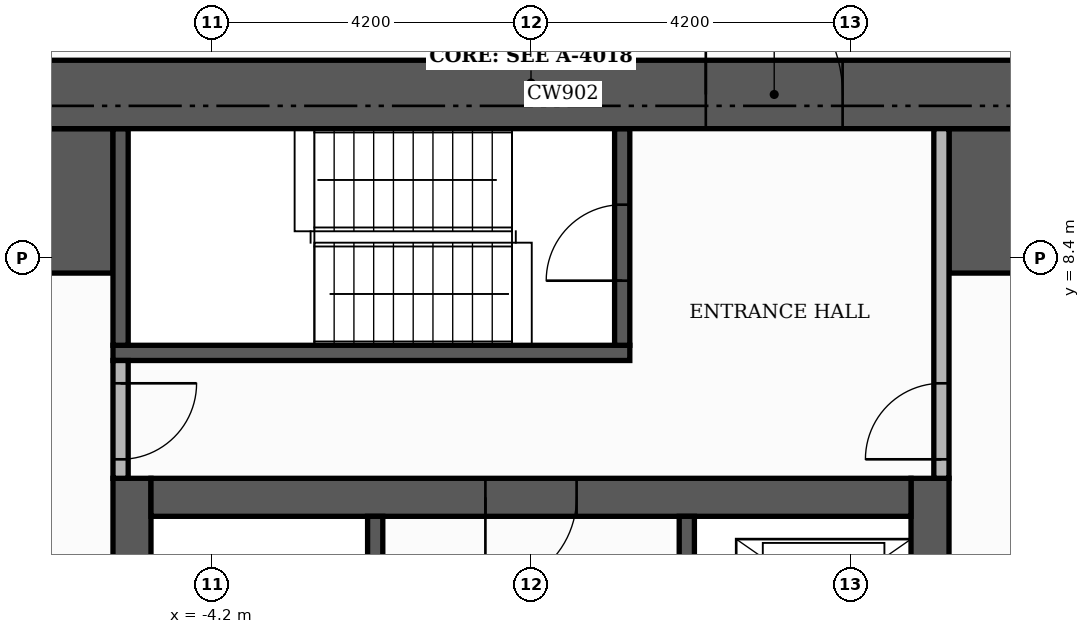
"""IFC4 building model, lengths in metres.
Left out: names, types, materials, properties, quantities, classifications, styles, units other than length and angle.
Written with IfcOpenShell. Run it as: python <this file> out.ifc"""

import sys

from ifc_helpers import new_model, si_unit, direction, frame, frame_2d, origin, place, context, subcontext, project, spatial, rectangle, extrude, element, fill, save


model = new_model("IFC4")
c1 = context("Model", 3, precision=1e-05, world=origin(), true_north=direction((0.0, 1.0)))
c2 = subcontext(c1, "Body", "Model", "MODEL_VIEW")
j1 = project(units=[si_unit("LENGTHUNIT", "METRE"), si_unit("PLANEANGLEUNIT", "RADIAN")], contexts=[c1])
p1 = place(None, origin())
s1 = spatial("IfcSite", under=j1, at=p1, CompositionType="ELEMENT")
p2 = place(p1, origin())
s2 = spatial("IfcBuilding", under=s1, at=p2, CompositionType="ELEMENT")
p3 = place(p2, frame((0.0, 0.0, 118.2)))
s3 = spatial("IfcBuildingStorey", under=s2, at=p3, CompositionType="ELEMENT", Elevation=118.2)
for number, where, z_axis, x_axis in (
    (1, (-5.25, -5.0, 0.0), (0.0, 0.0, 1.0), (0.0, 1.0, 0.0)),
    (2, (5.25, -5.0, 0.0), (0.0, 0.0, 1.0), (0.0, 1.0, 0.0)),
):
    element("IfcWall", number, at=place(p3, frame(where, z_axis=z_axis, x_axis=x_axis)), inside=s3, PredefinedType="SHEAR", context=c2, shape_type="SweptSolid", body=[
        extrude(rectangle(XDim=10.5, YDim=0.5, at=frame_2d((5.25, 0.0))), origin(), (0.0, 0.0, 1.0), 3.48),
    ])
p4 = place(p3, frame((-5.0, 5.25, 0.0), z_axis=(0.0, 0.0, 1.0), x_axis=(1.0, 0.0, 0.0)))
e3 = element("IfcWall", 3, at=p4, inside=s3, PredefinedType="SHEAR", context=c2, shape_type="SweptSolid", body=[
    extrude(rectangle(XDim=10.0, YDim=0.5, at=frame_2d((5.0, 0.0))), origin(), (0.0, 0.0, 1.0), 3.48),
])
p5 = place(p4, frame((4.4, 0.0, 0.0)))
e4 = element("IfcOpeningElement", 4, at=p5, cuts=e3, PredefinedType="OPENING", context=c2, shape_type="SweptSolid", body=[
    extrude(rectangle(XDim=1.2, YDim=2.1, at=frame_2d((0.6, 1.05))), frame((0.0, 0.26, 0.0), z_axis=(0.0, -1.0, 0.0), x_axis=(1.0, 0.0, 0.0)), (0.0, 0.0, 1.0), 0.52),
])
for number, where, z_axis, x_axis in (
    (5, (-10.1, 9.15, 0.0), (0.0, 0.0, 1.0), (1.0, 0.0, 0.0)),
    (6, (5.5, 9.15, 0.0), (0.0, 0.0, 1.0), (1.0, 0.0, 0.0)),
):
    element("IfcWall", number, at=place(p3, frame(where, z_axis=z_axis, x_axis=x_axis)), inside=s3, PredefinedType="SHEAR", context=c2, shape_type="SweptSolid", body=[
        extrude(rectangle(XDim=4.6, YDim=1.9, at=frame_2d((2.3, 0.0))), origin(), (0.0, 0.0, 1.0), 3.48),
    ])
p6 = place(p3, frame((-2.05, -1.4, 0.0), z_axis=(0.0, 0.0, 1.0), x_axis=(0.0, 1.0, 0.0)))
e7 = element("IfcWall", 7, at=p6, inside=s3, PredefinedType="SHEAR", context=c2, shape_type="SweptSolid", body=[
    extrude(rectangle(XDim=6.4, YDim=0.2, at=frame_2d((3.2, 0.0))), origin(), (0.0, 0.0, 1.0), 3.48),
])
p7 = place(p6, frame((0.15, 0.0, 0.0)))
e8 = element("IfcOpeningElement", 8, at=p7, cuts=e7, PredefinedType="OPENING", context=c2, shape_type="SweptSolid", body=[
    extrude(rectangle(XDim=1.0, YDim=2.1, at=frame_2d((0.5, 1.05))), frame((0.0, 0.11, 0.0), z_axis=(0.0, -1.0, 0.0), x_axis=(1.0, 0.0, 0.0)), (0.0, 0.0, 1.0), 0.22),
])
p8 = place(p3, frame((-5.5, 7.15, 0.0), z_axis=(0.0, 0.0, 1.0), x_axis=(1.0, 0.0, 0.0)))
e9 = element("IfcWall", 9, at=p8, inside=s3, PredefinedType="SHEAR", context=c2, shape_type="SweptSolid", body=[
    extrude(rectangle(XDim=6.8, YDim=0.2, at=frame_2d((3.4, 0.0))), origin(), (0.0, 0.0, 1.0), 3.48),
])
p9 = place(p3, frame((-5.4, 7.25, 0.0), z_axis=(0.0, 0.0, 1.0), x_axis=(0.0, 1.0, 0.0)))
e10 = element("IfcWall", 10, at=p9, inside=s3, PredefinedType="SHEAR", context=c2, shape_type="SweptSolid", body=[
    extrude(rectangle(XDim=2.85, YDim=0.2, at=frame_2d((1.425, 0.0))), origin(), (0.0, 0.0, 1.0), 3.48),
])
p10 = place(p3, frame((1.2, 7.25, 0.0), z_axis=(0.0, 0.0, 1.0), x_axis=(0.0, 1.0, 0.0)))
e11 = element("IfcWall", 11, at=p10, inside=s3, PredefinedType="SHEAR", context=c2, shape_type="SweptSolid", body=[
    extrude(rectangle(XDim=2.85, YDim=0.2, at=frame_2d((1.425, 0.0))), origin(), (0.0, 0.0, 1.0), 3.48),
])
p11 = place(p10, frame((0.85, 0.0, 0.0)))
e12 = element("IfcOpeningElement", 12, at=p11, cuts=e11, PredefinedType="OPENING", context=c2, shape_type="SweptSolid", body=[
    extrude(rectangle(XDim=1.0, YDim=2.1, at=frame_2d((0.5, 1.05))), frame((0.0, 0.11, 0.0), z_axis=(0.0, -1.0, 0.0), x_axis=(1.0, 0.0, 0.0)), (0.0, 0.0, 1.0), 0.22),
])
p12 = place(p3, frame((2.05, 1.6, 0.0), z_axis=(0.0, 0.0, 1.0), x_axis=(0.0, 1.0, 0.0)))
e13 = element("IfcWall", 13, at=p12, inside=s3, PredefinedType="SHEAR", context=c2, shape_type="SweptSolid", body=[
    extrude(rectangle(XDim=3.4, YDim=0.2, at=frame_2d((1.7, 0.0))), origin(), (0.0, 0.0, 1.0), 3.48),
])
p13 = place(p12, frame((1.75, 0.0, 0.0)))
e14 = element("IfcOpeningElement", 14, at=p13, cuts=e13, PredefinedType="OPENING", context=c2, shape_type="SweptSolid", body=[
    extrude(rectangle(XDim=1.1, YDim=2.1, at=frame_2d((0.55, 1.05))), frame((0.0, 0.11, 0.0), z_axis=(0.0, -1.0, 0.0), x_axis=(1.0, 0.0, 0.0)), (0.0, 0.0, 1.0), 0.22),
])
p14 = place(p12, frame((0.15, 0.0, 0.0)))
e15 = element("IfcOpeningElement", 15, at=p14, cuts=e13, PredefinedType="OPENING", context=c2, shape_type="SweptSolid", body=[
    extrude(rectangle(XDim=0.8, YDim=2.1, at=frame_2d((0.4, 1.05))), frame((0.0, 0.11, 0.0), z_axis=(0.0, -1.0, 0.0), x_axis=(1.0, 0.0, 0.0)), (0.0, 0.0, 1.0), 0.22),
])
p15 = place(p3, frame((-11.0, 10.55, 0.0), z_axis=(0.0, 0.0, 1.0), x_axis=(1.0, 0.0, 0.0)))
e16 = element("IfcWall", 16, at=p15, inside=s3, PredefinedType="SHEAR", context=c2, shape_type="SweptSolid", body=[
    extrude(rectangle(XDim=22.0, YDim=0.9, at=frame_2d((11.0, 0.0))), origin(), (0.0, 0.0, 1.0), 3.48),
])
p16 = place(p15, frame((13.3, 0.0, 0.0)))
e17 = element("IfcOpeningElement", 17, at=p16, cuts=e16, PredefinedType="OPENING", context=c2, shape_type="SweptSolid", body=[
    extrude(rectangle(XDim=1.8, YDim=2.2, at=frame_2d((0.9, 1.1))), frame((0.0, 0.46, 0.0), z_axis=(0.0, -1.0, 0.0), x_axis=(1.0, 0.0, 0.0)), (0.0, 0.0, 1.0), 0.92),
])
p17 = place(p3, frame((-5.4, 5.5, 0.0), z_axis=(0.0, 0.0, 1.0), x_axis=(0.0, 1.0, 0.0)))
e18 = element("IfcWall", 18, at=p17, inside=s3, PredefinedType="PARTITIONING", context=c2, shape_type="SweptSolid", body=[
    extrude(rectangle(XDim=1.55, YDim=0.2, at=frame_2d((0.775, 0.0))), origin(), (0.0, 0.0, 1.0), 3.48),
])
p18 = place(p17, frame((0.25, 0.0, 0.0)))
e19 = element("IfcOpeningElement", 19, at=p18, cuts=e18, PredefinedType="OPENING", context=c2, shape_type="SweptSolid", body=[
    extrude(rectangle(XDim=1.0, YDim=2.1, at=frame_2d((0.5, 1.05))), frame((0.0, 0.11, 0.0), z_axis=(0.0, -1.0, 0.0), x_axis=(1.0, 0.0, 0.0)), (0.0, 0.0, 1.0), 0.22),
])
p19 = place(p3, frame((5.4, 5.5, 0.0), z_axis=(0.0, 0.0, 1.0), x_axis=(0.0, 1.0, 0.0)))
e20 = element("IfcWall", 20, at=p19, inside=s3, PredefinedType="PARTITIONING", context=c2, shape_type="SweptSolid", body=[
    extrude(rectangle(XDim=4.6, YDim=0.2, at=frame_2d((2.3, 0.0))), origin(), (0.0, 0.0, 1.0), 3.48),
])
p20 = place(p19, frame((0.25, 0.0, 0.0)))
e21 = element("IfcOpeningElement", 21, at=p20, cuts=e20, PredefinedType="OPENING", context=c2, shape_type="SweptSolid", body=[
    extrude(rectangle(XDim=1.0, YDim=2.1, at=frame_2d((0.5, 1.05))), frame((0.0, 0.11, 0.0), z_axis=(0.0, -1.0, 0.0), x_axis=(1.0, 0.0, 0.0)), (0.0, 0.0, 1.0), 0.22),
])
p21 = place(p5, frame((1.2, 0.0, 0.0), z_axis=(0.0, 0.0, 1.0), x_axis=(-1.0, 0.0, 0.0)))
e22 = element("IfcDoor", 22, at=p21, inside=s3, OperationType="SINGLE_SWING_LEFT", PredefinedType="DOOR", context=c2, shape_type="SweptSolid", body=[
    extrude(rectangle(XDim=1.2, YDim=2.1, at=frame_2d((0.6, 1.05))), frame((0.0, 0.025, 0.0), z_axis=(0.0, -1.0, 0.0), x_axis=(1.0, 0.0, 0.0)), (0.0, 0.0, 1.0), 0.05),
])
fill(e4, e22)
p22 = place(p11, origin())
e23 = element("IfcDoor", 23, at=p22, inside=s3, OperationType="SINGLE_SWING_LEFT", PredefinedType="DOOR", context=c2, shape_type="SweptSolid", body=[
    extrude(rectangle(XDim=1.0, YDim=2.1, at=frame_2d((0.5, 1.05))), frame((0.0, 0.025, 0.0), z_axis=(0.0, -1.0, 0.0), x_axis=(1.0, 0.0, 0.0)), (0.0, 0.0, 1.0), 0.05),
])
fill(e12, e23)
p23 = place(p18, frame((1.0, 0.0, 0.0), z_axis=(0.0, 0.0, 1.0), x_axis=(-1.0, 0.0, 0.0)))
e24 = element("IfcDoor", 24, at=p23, inside=s3, OperationType="SINGLE_SWING_RIGHT", PredefinedType="DOOR", context=c2, shape_type="SweptSolid", body=[
    extrude(rectangle(XDim=1.0, YDim=2.1, at=frame_2d((0.5, 1.05))), frame((0.0, 0.025, 0.0), z_axis=(0.0, -1.0, 0.0), x_axis=(1.0, 0.0, 0.0)), (0.0, 0.0, 1.0), 0.05),
])
fill(e19, e24)
p24 = place(p20, origin())
e25 = element("IfcDoor", 25, at=p24, inside=s3, OperationType="SINGLE_SWING_LEFT", PredefinedType="DOOR", context=c2, shape_type="SweptSolid", body=[
    extrude(rectangle(XDim=1.0, YDim=2.1, at=frame_2d((0.5, 1.05))), frame((0.0, 0.025, 0.0), z_axis=(0.0, -1.0, 0.0), x_axis=(1.0, 0.0, 0.0)), (0.0, 0.0, 1.0), 0.05),
])
fill(e21, e25)
p25 = place(p16, origin())
e26 = element("IfcDoor", 26, at=p25, inside=s3, OperationType="DOUBLE_DOOR_SINGLE_SWING", PredefinedType="DOOR", context=c2, shape_type="SweptSolid", body=[
    extrude(rectangle(XDim=1.8, YDim=2.2, at=frame_2d((0.9, 1.1))), frame((0.0, 0.025, 0.0), z_axis=(0.0, -1.0, 0.0), x_axis=(1.0, 0.0, 0.0)), (0.0, 0.0, 1.0), 0.05),
])
fill(e17, e26)
save(model, sys.argv[1])
